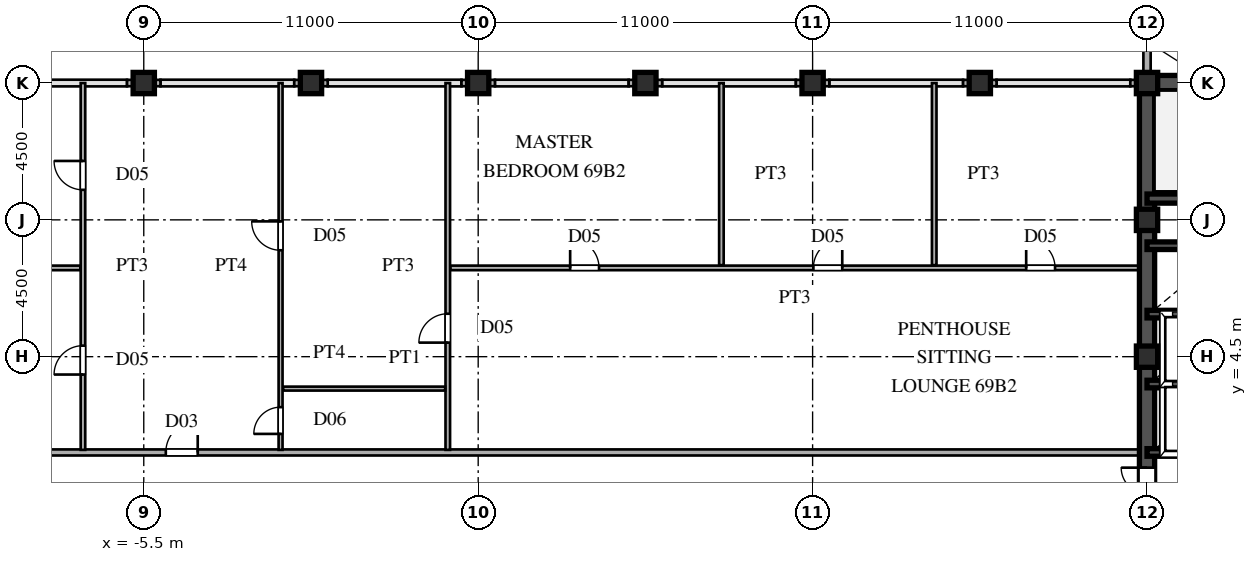
"""IFC4 building model, lengths in metres.
Left out: names, types, materials, properties, quantities, classifications, styles, units other than length and angle.
Written with IfcOpenShell. Run it as: python <this file> out.ifc"""

import sys

from ifc_helpers import new_model, si_unit, direction, frame, frame_2d, origin, origin_2d, place, context, subcontext, project, spatial, rectangle, hollow_rectangle, extrude, source, transform, mapped, element, fill, save


model = new_model("IFC4")
c1 = context("Model", 3, precision=1e-05, world=origin(), true_north=direction((0.0, 1.0)))
c2 = subcontext(c1, "Body", "Model", "MODEL_VIEW")
j1 = project(units=[si_unit("LENGTHUNIT", "METRE"), si_unit("PLANEANGLEUNIT", "RADIAN")], contexts=[c1])
p1 = place(None, origin())
s1 = spatial("IfcSite", under=j1, at=p1, CompositionType="ELEMENT")
p2 = place(p1, origin())
s2 = spatial("IfcBuilding", under=s1, at=p2, CompositionType="ELEMENT")
p3 = place(p2, frame((0.0, 0.0, 261.9)))
s3 = spatial("IfcBuildingStorey", under=s2, at=p3, CompositionType="ELEMENT", Elevation=261.9)
m1 = source(origin(), c2, "Body", "SweptSolid", [
    extrude(hollow_rectangle(XDim=0.7, YDim=0.7, WallThickness=0.03, at=origin_2d()), origin(), (0.0, 0.0, 1.0), 3.75),
])
for number, where, z_axis, x_axis in (
    (1, (27.5, 4.5, 0.0), (0.0, 0.0, 1.0), (1.0, 0.0, 0.0)),
    (2, (27.5, 9.0, 0.0), (0.0, 0.0, 1.0), (1.0, 0.0, 0.0)),
    (3, (27.5, 13.5, 0.0), (0.0, 0.0, 1.0), (1.0, 0.0, 0.0)),
    (4, (-5.5, 13.5, 0.0), (0.0, 0.0, 1.0), (1.0, 0.0, 0.0)),
    (5, (0.0, 13.5, 0.0), (0.0, 0.0, 1.0), (1.0, 0.0, 0.0)),
    (6, (5.5, 13.5, 0.0), (0.0, 0.0, 1.0), (1.0, 0.0, 0.0)),
    (7, (11.0, 13.5, 0.0), (0.0, 0.0, 1.0), (1.0, 0.0, 0.0)),
    (8, (16.5, 13.5, 0.0), (0.0, 0.0, 1.0), (1.0, 0.0, 0.0)),
    (9, (22.0, 13.5, 0.0), (0.0, 0.0, 1.0), (1.0, 0.0, 0.0)),
):
    element("IfcColumn", number, at=place(p3, frame(where, z_axis=z_axis, x_axis=x_axis)), inside=s3, PredefinedType="COLUMN", context=c2, shape_type="MappedRepresentation", body=[
        mapped(m1, transform((0.0, 0.0, 0.0), scale=1.0)),
    ])
p4 = place(p3, frame((27.5, 13.755, 0.0), z_axis=(0.0, 0.0, 1.0), x_axis=(0.0, 1.0, 0.0)))
e10 = element("IfcWall", 10, at=p4, inside=s3, PredefinedType="SOLIDWALL", context=c2, shape_type="SweptSolid", body=[
    extrude(rectangle(XDim=0.62, YDim=0.24, at=frame_2d((0.31, 0.0))), origin(), (0.0, 0.0, 1.0), 3.03),
])
p5 = place(p3, frame((27.5, 14.375, 0.0), z_axis=(0.0, 0.0, 1.0), x_axis=(0.0, 1.0, 0.0)))
e11 = element("IfcWall", 11, at=p5, inside=s3, PredefinedType="SOLIDWALL", context=c2, shape_type="SweptSolid", body=[
    extrude(rectangle(XDim=1.605, YDim=0.24, at=frame_2d((0.803, 0.0))), origin(), (0.0, 0.0, 1.0), 3.53),
])
for number, where, z_axis, x_axis in (
    (12, (-6.05, 13.5, 0.0), (0.0, 0.0, 1.0), (1.0, 0.0, 0.0)),
    (13, (-0.55, 13.5, 0.0), (0.0, 0.0, 1.0), (1.0, 0.0, 0.0)),
    (14, (4.95, 13.5, 0.0), (0.0, 0.0, 1.0), (1.0, 0.0, 0.0)),
    (15, (10.45, 13.5, 0.0), (0.0, 0.0, 1.0), (1.0, 0.0, 0.0)),
    (16, (15.95, 13.5, 0.0), (0.0, 0.0, 1.0), (1.0, 0.0, 0.0)),
    (17, (21.45, 13.5, 0.0), (0.0, 0.0, 1.0), (1.0, 0.0, 0.0)),
):
    element("IfcWall", number, at=place(p3, frame(where, z_axis=z_axis, x_axis=x_axis)), inside=s3, PredefinedType="SOLIDWALL", context=c2, shape_type="SweptSolid", body=[
        extrude(rectangle(XDim=1.1, YDim=0.21, at=frame_2d((0.55, 0.0))), origin(), (0.0, 0.0, 1.0), 3.03),
    ])
p6 = place(p3, frame((26.95, 13.5, 0.0), z_axis=(0.0, 0.0, 1.0), x_axis=(1.0, 0.0, 0.0)))
e18 = element("IfcWall", 18, at=p6, inside=s3, PredefinedType="SOLIDWALL", context=c2, shape_type="SweptSolid", body=[
    extrude(rectangle(XDim=0.54, YDim=0.21, at=frame_2d((0.27, 0.0))), origin(), (0.0, 0.0, 1.0), 3.03),
])
p7 = place(p3, frame((27.5, 1.3, 0.0), z_axis=(0.0, 0.0, 1.0), x_axis=(0.0, 1.0, 0.0)))
e19 = element("IfcWall", 19, at=p7, inside=s3, PredefinedType="SHEAR", context=c2, shape_type="SweptSolid", body=[
    extrude(rectangle(XDim=12.2, YDim=0.5, at=frame_2d((6.1, 0.0))), origin(), (0.0, 0.0, 1.0), 3.53),
])
p8 = place(p3, frame((27.5, -1.3, 0.0), z_axis=(0.0, 0.0, 1.0), x_axis=(0.0, 1.0, 0.0)))
e20 = element("IfcWall", 20, at=p8, inside=s3, PredefinedType="SHEAR", context=c2, shape_type="SweptSolid", body=[
    extrude(rectangle(XDim=2.6, YDim=0.5, at=frame_2d((1.3, 0.0))), origin(), (0.0, 0.0, 1.0), 3.53),
])
p9 = place(p8, frame((0.45, 0.0, 0.0)))
e21 = element("IfcOpeningElement", 21, at=p9, cuts=e20, PredefinedType="OPENING", context=c2, shape_type="SweptSolid", body=[
    extrude(rectangle(XDim=1.7, YDim=2.35, at=frame_2d((0.85, 1.175))), frame((0.0, 0.26, 0.0), z_axis=(0.0, -1.0, 0.0), x_axis=(1.0, 0.0, 0.0)), (0.0, 0.0, 1.0), 0.52),
])
p10 = place(p3, frame((27.5, 13.5, 0.0), z_axis=(0.0, 0.0, 1.0), x_axis=(1.0, 0.0, 0.0)))
e22 = element("IfcWall", 22, at=p10, inside=s3, PredefinedType="SHEAR", context=c2, shape_type="SweptSolid", body=[
    extrude(rectangle(XDim=9.0, YDim=0.5, at=frame_2d((4.5, 0.0))), origin(), (0.0, 0.0, 1.0), 3.53),
])
p11 = place(p3, frame((27.5, 9.7, 0.0), z_axis=(0.0, 0.0, 1.0), x_axis=(1.0, 0.0, 0.0)))
e23 = element("IfcWall", 23, at=p11, inside=s3, PredefinedType="SHEAR", context=c2, shape_type="SweptSolid", body=[
    extrude(rectangle(XDim=9.0, YDim=0.3, at=frame_2d((4.5, 0.0))), origin(), (0.0, 0.0, 1.0), 3.53),
])
p12 = place(p11, frame((7.3, 0.0, 0.0)))
e24 = element("IfcOpeningElement", 24, at=p12, cuts=e23, PredefinedType="OPENING", context=c2, shape_type="SweptSolid", body=[
    extrude(rectangle(XDim=1.1, YDim=2.2, at=frame_2d((0.55, 1.1))), frame((0.0, 0.16, 0.0), z_axis=(0.0, -1.0, 0.0), x_axis=(1.0, 0.0, 0.0)), (0.0, 0.0, 1.0), 0.32),
])
for number, where, z_axis, x_axis in (
    (25, (27.5, 1.35, 0.0), (0.0, 0.0, 1.0), (1.0, 0.0, 0.0)),
    (26, (27.5, 3.6, 0.0), (0.0, 0.0, 1.0), (1.0, 0.0, 0.0)),
    (27, (27.5, 5.9, 0.0), (0.0, 0.0, 1.0), (1.0, 0.0, 0.0)),
    (28, (27.5, 8.15, 0.0), (0.0, 0.0, 1.0), (1.0, 0.0, 0.0)),
):
    element("IfcWall", number, at=place(p3, frame(where, z_axis=z_axis, x_axis=x_axis)), inside=s3, PredefinedType="SHEAR", context=c2, shape_type="SweptSolid", body=[
        extrude(rectangle(XDim=2.8, YDim=0.25, at=frame_2d((1.4, 0.0))), origin(), (0.0, 0.0, 1.0), 3.53),
    ])
p13 = place(p3, frame((-27.245, 1.35, 0.0), z_axis=(0.0, 0.0, 1.0), x_axis=(1.0, 0.0, 0.0)))
e29 = element("IfcWall", 29, at=p13, inside=s3, PredefinedType="PARTITIONING", context=c2, shape_type="SweptSolid", body=[
    extrude(rectangle(XDim=54.49, YDim=0.2, at=frame_2d((27.245, 0.0))), origin(), (0.0, 0.0, 1.0), 3.53),
])
p14 = place(p13, frame((22.47, 0.0, 0.0)))
e30 = element("IfcOpeningElement", 30, at=p14, cuts=e29, PredefinedType="OPENING", context=c2, shape_type="SweptSolid", body=[
    extrude(rectangle(XDim=1.05, YDim=2.25, at=frame_2d((0.525, 1.125))), frame((0.0, 0.11, 0.0), z_axis=(0.0, -1.0, 0.0), x_axis=(1.0, 0.0, 0.0)), (0.0, 0.0, 1.0), 0.22),
])
p15 = place(p3, frame((-0.915, 3.45, 0.0), z_axis=(0.0, 0.0, 1.0), x_axis=(1.0, 0.0, 0.0)))
e31 = element("IfcWall", 31, at=p15, inside=s3, PredefinedType="PARTITIONING", context=c2, shape_type="SweptSolid", body=[
    extrude(rectangle(XDim=5.33, YDim=0.13, at=frame_2d((2.665, 0.0))), origin(), (0.0, 0.0, 1.0), 3.53),
])
p16 = place(p3, frame((-14.415, 7.42, 0.0), z_axis=(0.0, 0.0, 1.0), x_axis=(1.0, 0.0, 0.0)))
e32 = element("IfcWall", 32, at=p16, inside=s3, PredefinedType="PARTITIONING", context=c2, shape_type="SweptSolid", body=[
    extrude(rectangle(XDim=6.83, YDim=0.15, at=frame_2d((3.415, 0.0))), origin(), (0.0, 0.0, 1.0), 3.53),
])
p17 = place(p3, frame((4.585, 7.42, 0.0), z_axis=(0.0, 0.0, 1.0), x_axis=(1.0, 0.0, 0.0)))
e33 = element("IfcWall", 33, at=p17, inside=s3, PredefinedType="PARTITIONING", context=c2, shape_type="SweptSolid", body=[
    extrude(rectangle(XDim=22.66, YDim=0.15, at=frame_2d((11.33, 0.0))), origin(), (0.0, 0.0, 1.0), 3.53),
])
p18 = place(p17, frame((3.94, 0.0, 0.0)))
e34 = element("IfcOpeningElement", 34, at=p18, cuts=e33, PredefinedType="OPENING", context=c2, shape_type="SweptSolid", body=[
    extrude(rectangle(XDim=0.95, YDim=2.15, at=frame_2d((0.475, 1.075))), frame((0.0, 0.085, 0.0), z_axis=(0.0, -1.0, 0.0), x_axis=(1.0, 0.0, 0.0)), (0.0, 0.0, 1.0), 0.17),
])
p19 = place(p17, frame((11.94, 0.0, 0.0)))
e35 = element("IfcOpeningElement", 35, at=p19, cuts=e33, PredefinedType="OPENING", context=c2, shape_type="SweptSolid", body=[
    extrude(rectangle(XDim=0.95, YDim=2.15, at=frame_2d((0.475, 1.075))), frame((0.0, 0.085, 0.0), z_axis=(0.0, -1.0, 0.0), x_axis=(1.0, 0.0, 0.0)), (0.0, 0.0, 1.0), 0.17),
])
p20 = place(p17, frame((18.94, 0.0, 0.0)))
e36 = element("IfcOpeningElement", 36, at=p20, cuts=e33, PredefinedType="OPENING", context=c2, shape_type="SweptSolid", body=[
    extrude(rectangle(XDim=0.95, YDim=2.15, at=frame_2d((0.475, 1.075))), frame((0.0, 0.085, 0.0), z_axis=(0.0, -1.0, 0.0), x_axis=(1.0, 0.0, 0.0)), (0.0, 0.0, 1.0), 0.17),
])
p21 = place(p3, frame((-7.5, 1.435, 0.0), z_axis=(0.0, 0.0, 1.0), x_axis=(0.0, 1.0, 0.0)))
e37 = element("IfcWall", 37, at=p21, inside=s3, PredefinedType="PARTITIONING", context=c2, shape_type="SweptSolid", body=[
    extrude(rectangle(XDim=12.065, YDim=0.15, at=frame_2d((6.032, 0.0))), origin(), (0.0, 0.0, 1.0), 3.53),
])
p22 = place(p21, frame((2.478, 0.0, 0.0)))
e38 = element("IfcOpeningElement", 38, at=p22, cuts=e37, PredefinedType="OPENING", context=c2, shape_type="SweptSolid", body=[
    extrude(rectangle(XDim=0.95, YDim=2.15, at=frame_2d((0.475, 1.075))), frame((0.0, 0.085, 0.0), z_axis=(0.0, -1.0, 0.0), x_axis=(1.0, 0.0, 0.0)), (0.0, 0.0, 1.0), 0.17),
])
p23 = place(p21, frame((8.552, 0.0, 0.0)))
e39 = element("IfcOpeningElement", 39, at=p23, cuts=e37, PredefinedType="OPENING", context=c2, shape_type="SweptSolid", body=[
    extrude(rectangle(XDim=0.95, YDim=2.15, at=frame_2d((0.475, 1.075))), frame((0.0, 0.085, 0.0), z_axis=(0.0, -1.0, 0.0), x_axis=(1.0, 0.0, 0.0)), (0.0, 0.0, 1.0), 0.17),
])
p24 = place(p3, frame((-1.0, 1.435, 0.0), z_axis=(0.0, 0.0, 1.0), x_axis=(0.0, 1.0, 0.0)))
e40 = element("IfcWall", 40, at=p24, inside=s3, PredefinedType="PARTITIONING", context=c2, shape_type="SweptSolid", body=[
    extrude(rectangle(XDim=12.065, YDim=0.13, at=frame_2d((6.032, 0.0))), origin(), (0.0, 0.0, 1.0), 3.53),
])
p25 = place(p24, frame((0.525, 0.0, 0.0)))
e41 = element("IfcOpeningElement", 41, at=p25, cuts=e40, PredefinedType="OPENING", context=c2, shape_type="SweptSolid", body=[
    extrude(rectangle(XDim=0.88, YDim=2.1, at=frame_2d((0.44, 1.05))), frame((0.0, 0.075, 0.0), z_axis=(0.0, -1.0, 0.0), x_axis=(1.0, 0.0, 0.0)), (0.0, 0.0, 1.0), 0.15),
])
p26 = place(p24, frame((6.565, 0.0, 0.0)))
e42 = element("IfcOpeningElement", 42, at=p26, cuts=e40, PredefinedType="OPENING", context=c2, shape_type="SweptSolid", body=[
    extrude(rectangle(XDim=0.95, YDim=2.15, at=frame_2d((0.475, 1.075))), frame((0.0, 0.075, 0.0), z_axis=(0.0, -1.0, 0.0), x_axis=(1.0, 0.0, 0.0)), (0.0, 0.0, 1.0), 0.15),
])
p27 = place(p3, frame((4.5, 1.435, 0.0), z_axis=(0.0, 0.0, 1.0), x_axis=(0.0, 1.0, 0.0)))
e43 = element("IfcWall", 43, at=p27, inside=s3, PredefinedType="PARTITIONING", context=c2, shape_type="SweptSolid", body=[
    extrude(rectangle(XDim=12.065, YDim=0.15, at=frame_2d((6.032, 0.0))), origin(), (0.0, 0.0, 1.0), 3.53),
])
p28 = place(p27, frame((3.528, 0.0, 0.0)))
e44 = element("IfcOpeningElement", 44, at=p28, cuts=e43, PredefinedType="OPENING", context=c2, shape_type="SweptSolid", body=[
    extrude(rectangle(XDim=0.95, YDim=2.15, at=frame_2d((0.475, 1.075))), frame((0.0, 0.085, 0.0), z_axis=(0.0, -1.0, 0.0), x_axis=(1.0, 0.0, 0.0)), (0.0, 0.0, 1.0), 0.17),
])
for number, where, z_axis, x_axis in (
    (45, (13.5, 7.51, 0.0), (0.0, 0.0, 1.0), (0.0, 1.0, 0.0)),
    (46, (20.5, 7.51, 0.0), (0.0, 0.0, 1.0), (0.0, 1.0, 0.0)),
):
    element("IfcWall", number, at=place(p3, frame(where, z_axis=z_axis, x_axis=x_axis)), inside=s3, PredefinedType="PARTITIONING", context=c2, shape_type="SweptSolid", body=[
        extrude(rectangle(XDim=5.99, YDim=0.15, at=frame_2d((2.995, 0.0))), origin(), (0.0, 0.0, 1.0), 3.53),
    ])
m2 = source(origin(), c2, "Body", "SweptSolid", [
    extrude(rectangle(XDim=1.7, YDim=2.35, at=frame_2d((0.85, 1.175))), frame((0.0, 0.025, 0.0), z_axis=(0.0, -1.0, 0.0), x_axis=(1.0, 0.0, 0.0)), (0.0, 0.0, 1.0), 0.05),
])
p29 = place(p9, origin())
e47 = element("IfcDoor", 47, at=p29, inside=s3, OperationType="DOUBLE_SWING_LEFT", PredefinedType="DOOR", context=c2, shape_type="MappedRepresentation", body=[
    mapped(m2, transform((0.0, 0.0, 0.0), scale=1.0)),
])
fill(e21, e47)
m3 = source(origin(), c2, "Body", "SweptSolid", [
    extrude(rectangle(XDim=1.05, YDim=2.25, at=frame_2d((0.525, 1.125))), frame((0.0, 0.025, 0.0), z_axis=(0.0, -1.0, 0.0), x_axis=(1.0, 0.0, 0.0)), (0.0, 0.0, 1.0), 0.05),
])
p30 = place(p14, origin())
e48 = element("IfcDoor", 48, at=p30, inside=s3, OperationType="SINGLE_SWING_RIGHT", PredefinedType="DOOR", context=c2, shape_type="MappedRepresentation", body=[
    mapped(m3, transform((0.0, 0.0, 0.0), scale=1.0)),
])
fill(e30, e48)
m4 = source(origin(), c2, "Body", "SweptSolid", [
    extrude(rectangle(XDim=0.95, YDim=2.15, at=frame_2d((0.475, 1.075))), frame((0.0, 0.025, 0.0), z_axis=(0.0, -1.0, 0.0), x_axis=(1.0, 0.0, 0.0)), (0.0, 0.0, 1.0), 0.05),
])
p31 = place(p18, origin())
e49 = element("IfcDoor", 49, at=p31, inside=s3, OperationType="SINGLE_SWING_LEFT", PredefinedType="DOOR", context=c2, shape_type="MappedRepresentation", body=[
    mapped(m4, transform((0.0, 0.0, 0.0), scale=1.0)),
])
fill(e34, e49)
p32 = place(p19, origin())
e50 = element("IfcDoor", 50, at=p32, inside=s3, OperationType="SINGLE_SWING_RIGHT", PredefinedType="DOOR", context=c2, shape_type="MappedRepresentation", body=[
    mapped(m4, transform((0.0, 0.0, 0.0), scale=1.0)),
])
fill(e35, e50)
p33 = place(p20, origin())
e51 = element("IfcDoor", 51, at=p33, inside=s3, OperationType="SINGLE_SWING_LEFT", PredefinedType="DOOR", context=c2, shape_type="MappedRepresentation", body=[
    mapped(m4, transform((0.0, 0.0, 0.0), scale=1.0)),
])
fill(e36, e51)
p34 = place(p22, origin())
e52 = element("IfcDoor", 52, at=p34, inside=s3, OperationType="SINGLE_SWING_LEFT", PredefinedType="DOOR", context=c2, shape_type="MappedRepresentation", body=[
    mapped(m4, transform((0.0, 0.0, 0.0), scale=1.0)),
])
fill(e38, e52)
p35 = place(p23, origin())
e53 = element("IfcDoor", 53, at=p35, inside=s3, OperationType="SINGLE_SWING_RIGHT", PredefinedType="DOOR", context=c2, shape_type="MappedRepresentation", body=[
    mapped(m4, transform((0.0, 0.0, 0.0), scale=1.0)),
])
fill(e39, e53)
m5 = source(origin(), c2, "Body", "SweptSolid", [
    extrude(rectangle(XDim=0.88, YDim=2.1, at=frame_2d((0.44, 1.05))), frame((0.0, 0.025, 0.0), z_axis=(0.0, -1.0, 0.0), x_axis=(1.0, 0.0, 0.0)), (0.0, 0.0, 1.0), 0.05),
])
p36 = place(p25, origin())
e54 = element("IfcDoor", 54, at=p36, inside=s3, OperationType="SINGLE_SWING_LEFT", PredefinedType="DOOR", context=c2, shape_type="MappedRepresentation", body=[
    mapped(m5, transform((0.0, 0.0, 0.0), scale=1.0)),
])
fill(e41, e54)
p37 = place(p26, origin())
e55 = element("IfcDoor", 55, at=p37, inside=s3, OperationType="SINGLE_SWING_RIGHT", PredefinedType="DOOR", context=c2, shape_type="MappedRepresentation", body=[
    mapped(m4, transform((0.0, 0.0, 0.0), scale=1.0)),
])
fill(e42, e55)
p38 = place(p28, origin())
e56 = element("IfcDoor", 56, at=p38, inside=s3, OperationType="SINGLE_SWING_LEFT", PredefinedType="DOOR", context=c2, shape_type="MappedRepresentation", body=[
    mapped(m4, transform((0.0, 0.0, 0.0), scale=1.0)),
])
fill(e44, e56)
save(model, sys.argv[1])
